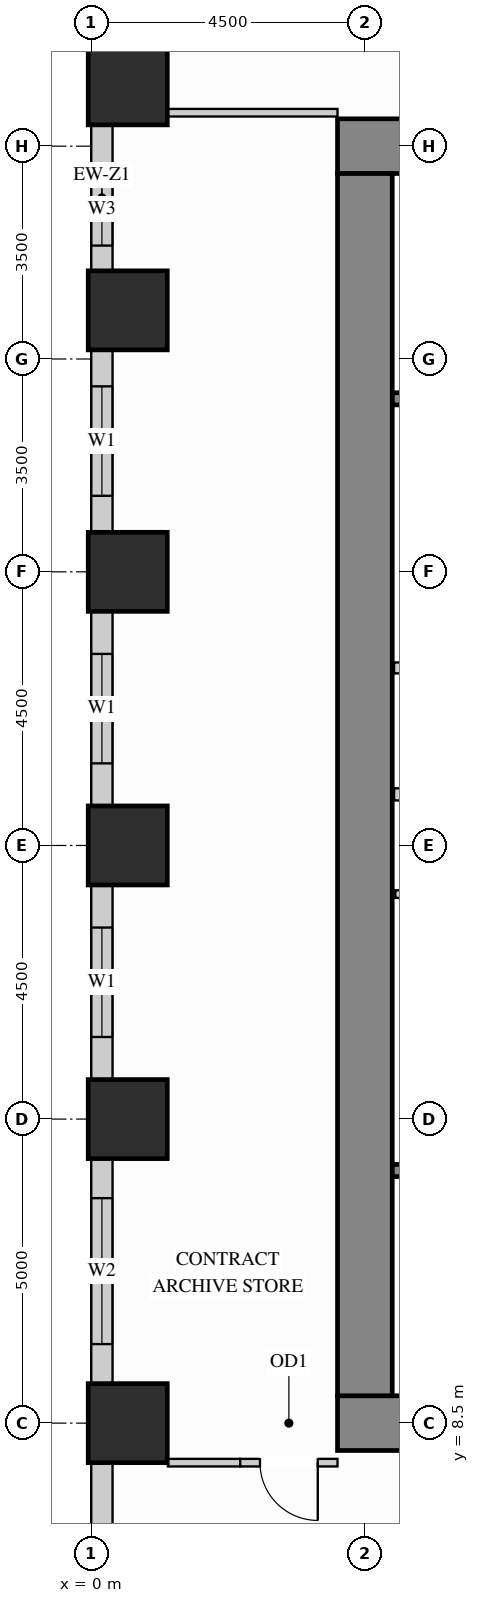
"""IFC4 building model, lengths in metres.
Left out: names, types, materials, properties, quantities, classifications, styles, units other than length and angle.
Written with IfcOpenShell. Run it as: python <this file> out.ifc"""

import sys

from ifc_helpers import new_model, si_unit, direction, frame, frame_2d, origin, origin_2d, place, context, subcontext, project, spatial, rectangle, extrude, source, transform, mapped, element, fill, save


model = new_model("IFC4")
c1 = context("Model", 3, precision=1e-05, world=origin(), true_north=direction((0.0, 1.0)))
c2 = subcontext(c1, "Body", "Model", "MODEL_VIEW")
j1 = project(units=[si_unit("LENGTHUNIT", "METRE"), si_unit("PLANEANGLEUNIT", "RADIAN")], contexts=[c1])
p1 = place(None, origin())
s1 = spatial("IfcSite", under=j1, at=p1, CompositionType="ELEMENT")
p2 = place(p1, origin())
s2 = spatial("IfcBuilding", under=s1, at=p2, CompositionType="ELEMENT")
p3 = place(p2, frame((0.0, 0.0, 62.1)))
s3 = spatial("IfcBuildingStorey", under=s2, at=p3, CompositionType="ELEMENT", Elevation=62.1)
m1 = source(origin(), c2, "Body", "SweptSolid", [
    extrude(rectangle(XDim=1.3, YDim=1.3, at=origin_2d()), origin(), (0.0, 0.0, 1.0), 3.38),
])
for number, where, z_axis, x_axis in (
    (1, (0.6, 13.5, 0.0), (0.0, 0.0, 1.0), (1.0, 0.0, 0.0)),
    (2, (0.6, 18.0, 0.0), (0.0, 0.0, 1.0), (1.0, 0.0, 0.0)),
    (3, (0.6, 22.5, 0.0), (0.0, 0.0, 1.0), (1.0, 0.0, 0.0)),
    (4, (0.6, 26.8, 0.0), (0.0, 0.0, 1.0), (1.0, 0.0, 0.0)),
    (5, (0.6, 30.5, 0.0), (0.0, 0.0, 1.0), (1.0, 0.0, 0.0)),
    (6, (0.6, 8.5, 0.0), (0.0, 0.0, 1.0), (1.0, 0.0, 0.0)),
):
    element("IfcColumn", number, at=place(p3, frame(where, z_axis=z_axis, x_axis=x_axis)), inside=s3, PredefinedType="COLUMN", context=c2, shape_type="MappedRepresentation", body=[
        mapped(m1, transform((0.0, 0.0, 0.0), x_axis=(1.0, 0.0, 0.0), y_axis=(0.0, 1.0, 0.0), z_axis=(0.0, 0.0, 1.0))),
    ])
m2 = source(origin(), c2, "Body", "SweptSolid", [
    extrude(rectangle(XDim=10.9, YDim=0.9, at=frame_2d((5.45, 0.0))), origin(), (0.0, 0.0, 1.0), 3.38),
])
for number, where, z_axis, x_axis in (
    (7, (4.05, 29.5, 0.0), (0.0, 0.0, 1.0), (1.0, 0.0, 0.0)),
    (8, (4.05, 8.5, 0.0), (0.0, 0.0, 1.0), (1.0, 0.0, 0.0)),
):
    element("IfcWall", number, at=place(p3, frame(where, z_axis=z_axis, x_axis=x_axis)), inside=s3, PredefinedType="SHEAR", context=c2, shape_type="MappedRepresentation", body=[
        mapped(m2, transform((0.0, 0.0, 0.0), x_axis=(1.0, 0.0, 0.0), y_axis=(0.0, 1.0, 0.0), z_axis=(0.0, 0.0, 1.0))),
    ])
m3 = source(origin(), c2, "Body", "SweptSolid", [
    extrude(rectangle(XDim=20.1, YDim=0.9, at=frame_2d((10.05, 0.0))), origin(), (0.0, 0.0, 1.0), 3.38),
])
p4 = place(p3, frame((4.5, 8.95, 0.0), z_axis=(0.0, 0.0, 1.0), x_axis=(0.0, 1.0, 0.0)))
e9 = element("IfcWall", 9, at=p4, inside=s3, PredefinedType="SHEAR", context=c2, shape_type="MappedRepresentation", body=[
    mapped(m3, transform((0.0, 0.0, 0.0), x_axis=(1.0, 0.0, 0.0), y_axis=(0.0, 1.0, 0.0), z_axis=(0.0, 0.0, 1.0))),
])
p5 = place(p3, frame((0.175, 29.852, 0.0), z_axis=(0.0, 0.0, 1.0), x_axis=(0.0, -1.0, 0.0)))
e10 = element("IfcWall", 10, at=p5, inside=s3, PredefinedType="SOLIDWALL", context=c2, shape_type="SweptSolid", body=[
    extrude(rectangle(XDim=2.404, YDim=0.35, at=frame_2d((1.202, 0.0))), origin(), (0.0, 0.0, 1.0), 2.51),
])
p6 = place(p5, frame((0.787, 0.0, 0.78)))
e11 = element("IfcOpeningElement", 11, at=p6, cuts=e10, PredefinedType="OPENING", context=c2, shape_type="SweptSolid", body=[
    extrude(rectangle(XDim=1.2, YDim=1.55, at=frame_2d((0.6, 0.775))), frame((0.0, 0.185, 0.0), z_axis=(0.0, -1.0, 0.0), x_axis=(1.0, 0.0, 0.0)), (0.0, 0.0, 1.0), 0.37),
])
p7 = place(p3, frame((0.175, 26.152, 0.0), z_axis=(0.0, 0.0, 1.0), x_axis=(0.0, -1.0, 0.0)))
e12 = element("IfcWall", 12, at=p7, inside=s3, PredefinedType="SOLIDWALL", context=c2, shape_type="SweptSolid", body=[
    extrude(rectangle(XDim=3.004, YDim=0.35, at=frame_2d((1.502, 0.0))), origin(), (0.0, 0.0, 1.0), 2.51),
])
p8 = place(p7, frame((0.602, 0.0, 0.78)))
e13 = element("IfcOpeningElement", 13, at=p8, cuts=e12, PredefinedType="OPENING", context=c2, shape_type="SweptSolid", body=[
    extrude(rectangle(XDim=1.8, YDim=1.55, at=frame_2d((0.9, 0.775))), frame((0.0, 0.185, 0.0), z_axis=(0.0, -1.0, 0.0), x_axis=(1.0, 0.0, 0.0)), (0.0, 0.0, 1.0), 0.37),
])
p9 = place(p3, frame((0.175, 21.852, 0.0), z_axis=(0.0, 0.0, 1.0), x_axis=(0.0, -1.0, 0.0)))
e14 = element("IfcWall", 14, at=p9, inside=s3, PredefinedType="SOLIDWALL", context=c2, shape_type="SweptSolid", body=[
    extrude(rectangle(XDim=3.204, YDim=0.35, at=frame_2d((1.602, 0.0))), origin(), (0.0, 0.0, 1.0), 2.51),
])
p10 = place(p9, frame((0.702, 0.0, 0.78)))
e15 = element("IfcOpeningElement", 15, at=p10, cuts=e14, PredefinedType="OPENING", context=c2, shape_type="SweptSolid", body=[
    extrude(rectangle(XDim=1.8, YDim=1.55, at=frame_2d((0.9, 0.775))), frame((0.0, 0.185, 0.0), z_axis=(0.0, -1.0, 0.0), x_axis=(1.0, 0.0, 0.0)), (0.0, 0.0, 1.0), 0.37),
])
p11 = place(p3, frame((0.175, 17.352, 0.0), z_axis=(0.0, 0.0, 1.0), x_axis=(0.0, -1.0, 0.0)))
e16 = element("IfcWall", 16, at=p11, inside=s3, PredefinedType="SOLIDWALL", context=c2, shape_type="SweptSolid", body=[
    extrude(rectangle(XDim=3.204, YDim=0.35, at=frame_2d((1.602, 0.0))), origin(), (0.0, 0.0, 1.0), 2.51),
])
p12 = place(p11, frame((0.702, 0.0, 0.78)))
e17 = element("IfcOpeningElement", 17, at=p12, cuts=e16, PredefinedType="OPENING", context=c2, shape_type="SweptSolid", body=[
    extrude(rectangle(XDim=1.8, YDim=1.55, at=frame_2d((0.9, 0.775))), frame((0.0, 0.185, 0.0), z_axis=(0.0, -1.0, 0.0), x_axis=(1.0, 0.0, 0.0)), (0.0, 0.0, 1.0), 0.37),
])
p13 = place(p3, frame((0.175, 12.852, 0.0), z_axis=(0.0, 0.0, 1.0), x_axis=(0.0, -1.0, 0.0)))
e18 = element("IfcWall", 18, at=p13, inside=s3, PredefinedType="SOLIDWALL", context=c2, shape_type="SweptSolid", body=[
    extrude(rectangle(XDim=3.704, YDim=0.35, at=frame_2d((1.852, 0.0))), origin(), (0.0, 0.0, 1.0), 2.51),
])
p14 = place(p13, frame((0.652, 0.0, 0.78)))
e19 = element("IfcOpeningElement", 19, at=p14, cuts=e18, PredefinedType="OPENING", context=c2, shape_type="SweptSolid", body=[
    extrude(rectangle(XDim=2.4, YDim=1.55, at=frame_2d((1.2, 0.775))), frame((0.0, 0.185, 0.0), z_axis=(0.0, -1.0, 0.0), x_axis=(1.0, 0.0, 0.0)), (0.0, 0.0, 1.0), 0.37),
])
p15 = place(p3, frame((0.175, 7.852, 0.0), z_axis=(0.0, 0.0, 1.0), x_axis=(0.0, -1.0, 0.0)))
e20 = element("IfcWall", 20, at=p15, inside=s3, PredefinedType="SOLIDWALL", context=c2, shape_type="SweptSolid", body=[
    extrude(rectangle(XDim=3.704, YDim=0.35, at=frame_2d((1.852, 0.0))), origin(), (0.0, 0.0, 1.0), 2.51),
])
p16 = place(p15, frame((2.068, 0.0, 0.78)))
e21 = element("IfcOpeningElement", 21, at=p16, cuts=e20, PredefinedType="OPENING", context=c2, shape_type="SweptSolid", body=[
    extrude(rectangle(XDim=1.2, YDim=1.55, at=frame_2d((0.6, 0.775))), frame((0.0, 0.185, 0.0), z_axis=(0.0, -1.0, 0.0), x_axis=(1.0, 0.0, 0.0)), (0.0, 0.0, 1.0), 0.37),
])
m4 = source(origin(), c2, "Body", "SweptSolid", [
    extrude(rectangle(XDim=2.17, YDim=0.18, at=frame_2d((1.085, 0.0))), origin(), (0.0, 0.0, 1.0), 3.365),
])
p17 = place(p3, frame((4.98, 20.92, 0.0), z_axis=(0.0, 0.0, 1.0), x_axis=(1.0, 0.0, 0.0)))
e22 = element("IfcWall", 22, at=p17, inside=s3, PredefinedType="PARTITIONING", context=c2, shape_type="MappedRepresentation", body=[
    mapped(m4, transform((0.0, 0.0, 0.0), x_axis=(1.0, 0.0, 0.0), y_axis=(0.0, 1.0, 0.0), z_axis=(0.0, 0.0, 1.0))),
])
p18 = place(p3, frame((5.0, 17.2, 0.0), z_axis=(0.0, 0.0, 1.0), x_axis=(1.0, 0.0, 0.0)))
e23 = element("IfcWall", 23, at=p18, inside=s3, PredefinedType="PARTITIONING", context=c2, shape_type="SweptSolid", body=[
    extrude(rectangle(XDim=2.4, YDim=0.125, at=frame_2d((1.2, 0.0))), origin(), (0.0, 0.0, 1.0), 3.365),
])
p19 = place(p18, frame((0.7, 0.0, 0.0)))
e24 = element("IfcOpeningElement", 24, at=p19, cuts=e23, PredefinedType="OPENING", context=c2, shape_type="SweptSolid", body=[
    extrude(rectangle(XDim=0.85, YDim=2.1, at=frame_2d((0.425, 1.05))), frame((0.0, 0.073, 0.0), z_axis=(0.0, -1.0, 0.0), x_axis=(1.0, 0.0, 0.0)), (0.0, 0.0, 1.0), 0.145),
])
m5 = source(origin(), c2, "Body", "SweptSolid", [
    extrude(rectangle(XDim=2.79, YDim=0.125, at=frame_2d((1.395, 0.0))), origin(), (0.0, 0.0, 1.0), 3.365),
])
p20 = place(p3, frame((1.26, 30.05, 0.0), z_axis=(0.0, 0.0, 1.0), x_axis=(1.0, 0.0, 0.0)))
e25 = element("IfcWall", 25, at=p20, inside=s3, PredefinedType="PARTITIONING", context=c2, shape_type="MappedRepresentation", body=[
    mapped(m5, transform((0.0, 0.0, 0.0), x_axis=(1.0, 0.0, 0.0), y_axis=(0.0, 1.0, 0.0), z_axis=(0.0, 0.0, 1.0))),
])
m6 = source(origin(), c2, "Body", "SweptSolid", [
    extrude(rectangle(XDim=1.19, YDim=0.125, at=frame_2d((0.595, 0.0))), origin(), (0.0, 0.0, 1.0), 3.365),
])
p21 = place(p3, frame((1.26, 7.85, 0.0), z_axis=(0.0, 0.0, 1.0), x_axis=(1.0, 0.0, 0.0)))
e26 = element("IfcWall", 26, at=p21, inside=s3, PredefinedType="PARTITIONING", context=c2, shape_type="MappedRepresentation", body=[
    mapped(m6, transform((0.0, 0.0, 0.0), x_axis=(1.0, 0.0, 0.0), y_axis=(0.0, 1.0, 0.0), z_axis=(0.0, 0.0, 1.0))),
])
p22 = place(p3, frame((2.45, 7.85, 0.0), z_axis=(0.0, 0.0, 1.0), x_axis=(1.0, 0.0, 0.0)))
e27 = element("IfcWall", 27, at=p22, inside=s3, PredefinedType="PARTITIONING", context=c2, shape_type="SweptSolid", body=[
    extrude(rectangle(XDim=1.6, YDim=0.125, at=frame_2d((0.8, 0.0))), origin(), (0.0, 0.0, 1.0), 3.365),
])
p23 = place(p22, frame((0.325, 0.0, 0.0)))
e28 = element("IfcOpeningElement", 28, at=p23, cuts=e27, PredefinedType="OPENING", context=c2, shape_type="SweptSolid", body=[
    extrude(rectangle(XDim=0.95, YDim=2.15, at=frame_2d((0.475, 1.075))), frame((0.0, 0.073, 0.0), z_axis=(0.0, -1.0, 0.0), x_axis=(1.0, 0.0, 0.0)), (0.0, 0.0, 1.0), 0.145),
])
m7 = source(origin(), c2, "Body", "SweptSolid", [
    extrude(rectangle(XDim=2.09, YDim=0.2, at=frame_2d((1.045, 0.0))), origin(), (0.0, 0.0, 1.0), 3.365),
])
p24 = place(p3, frame((4.98, 18.84, 0.0), z_axis=(0.0, 0.0, 1.0), x_axis=(1.0, 0.0, 0.0)))
e29 = element("IfcWall", 29, at=p24, inside=s3, PredefinedType="PARTITIONING", context=c2, shape_type="MappedRepresentation", body=[
    mapped(m7, transform((0.0, 0.0, 0.0), x_axis=(1.0, 0.0, 0.0), y_axis=(0.0, 1.0, 0.0), z_axis=(0.0, 0.0, 1.0))),
])
p25 = place(p3, frame((4.952, 12.655, 0.0), z_axis=(0.0, 0.0, 1.0), x_axis=(1.0, 0.0, 0.0)))
e30 = element("IfcWall", 30, at=p25, inside=s3, PredefinedType="SHEAR", context=c2, shape_type="SweptSolid", body=[
    extrude(rectangle(XDim=7.453, YDim=0.2, at=frame_2d((3.727, 0.0))), origin(), (0.0, 0.0, 1.0), 3.38),
])
p26 = place(p25, frame((0.4, 0.0, 0.0)))
e31 = element("IfcOpeningElement", 31, at=p26, cuts=e30, PredefinedType="OPENING", context=c2, shape_type="SweptSolid", body=[
    extrude(rectangle(XDim=1.1, YDim=2.15, at=frame_2d((0.55, 1.075))), frame((0.0, 0.11, 0.0), z_axis=(0.0, -1.0, 0.0), x_axis=(1.0, 0.0, 0.0)), (0.0, 0.0, 1.0), 0.22),
])
p27 = place(p3, frame((4.952, 25.345, 0.0), z_axis=(0.0, 0.0, 1.0), x_axis=(1.0, 0.0, 0.0)))
e32 = element("IfcWall", 32, at=p27, inside=s3, PredefinedType="SHEAR", context=c2, shape_type="SweptSolid", body=[
    extrude(rectangle(XDim=7.453, YDim=0.2, at=frame_2d((3.727, 0.0))), origin(), (0.0, 0.0, 1.0), 3.38),
])
p28 = place(p27, frame((0.4, 0.0, 0.0)))
e33 = element("IfcOpeningElement", 33, at=p28, cuts=e32, PredefinedType="OPENING", context=c2, shape_type="SweptSolid", body=[
    extrude(rectangle(XDim=1.1, YDim=2.15, at=frame_2d((0.55, 1.075))), frame((0.0, 0.11, 0.0), z_axis=(0.0, -1.0, 0.0), x_axis=(1.0, 0.0, 0.0)), (0.0, 0.0, 1.0), 0.22),
])
m8 = source(origin(), c2, "Body", "SweptSolid", [
    extrude(rectangle(XDim=0.95, YDim=2.15, at=frame_2d((0.475, 1.075))), frame((0.0, 0.025, 0.0), z_axis=(0.0, -1.0, 0.0), x_axis=(1.0, 0.0, 0.0)), (0.0, 0.0, 1.0), 0.05),
])
p29 = place(p23, origin())
e34 = element("IfcDoor", 34, at=p29, inside=s3, OperationType="SINGLE_SWING_RIGHT", PredefinedType="DOOR", context=c2, shape_type="MappedRepresentation", body=[
    mapped(m8, transform((0.0, 0.0, 0.0), x_axis=(1.0, 0.0, 0.0), y_axis=(0.0, 1.0, 0.0), z_axis=(0.0, 0.0, 1.0))),
])
fill(e28, e34)
m9 = source(origin(), c2, "Body", "SweptSolid", [
    extrude(rectangle(XDim=1.8, YDim=1.55, at=frame_2d((0.9, 0.775))), frame((0.0, 0.03, 0.0), z_axis=(0.0, -1.0, 0.0), x_axis=(1.0, 0.0, 0.0)), (0.0, 0.0, 1.0), 0.06),
])
p30 = place(p8, origin())
e35 = element("IfcWindow", 35, at=p30, inside=s3, PartitioningType="SINGLE_PANEL", PredefinedType="WINDOW", context=c2, shape_type="MappedRepresentation", body=[
    mapped(m9, transform((0.0, 0.0, 0.0), x_axis=(1.0, 0.0, 0.0), y_axis=(0.0, 1.0, 0.0), z_axis=(0.0, 0.0, 1.0))),
])
fill(e13, e35)
p31 = place(p10, origin())
e36 = element("IfcWindow", 36, at=p31, inside=s3, PartitioningType="SINGLE_PANEL", PredefinedType="WINDOW", context=c2, shape_type="MappedRepresentation", body=[
    mapped(m9, transform((0.0, 0.0, 0.0), x_axis=(1.0, 0.0, 0.0), y_axis=(0.0, 1.0, 0.0), z_axis=(0.0, 0.0, 1.0))),
])
fill(e15, e36)
p32 = place(p12, origin())
e37 = element("IfcWindow", 37, at=p32, inside=s3, PartitioningType="SINGLE_PANEL", PredefinedType="WINDOW", context=c2, shape_type="MappedRepresentation", body=[
    mapped(m9, transform((0.0, 0.0, 0.0), x_axis=(1.0, 0.0, 0.0), y_axis=(0.0, 1.0, 0.0), z_axis=(0.0, 0.0, 1.0))),
])
fill(e17, e37)
m10 = source(origin(), c2, "Body", "SweptSolid", [
    extrude(rectangle(XDim=2.4, YDim=1.55, at=frame_2d((1.2, 0.775))), frame((0.0, 0.03, 0.0), z_axis=(0.0, -1.0, 0.0), x_axis=(1.0, 0.0, 0.0)), (0.0, 0.0, 1.0), 0.06),
])
p33 = place(p14, origin())
e38 = element("IfcWindow", 38, at=p33, inside=s3, PartitioningType="SINGLE_PANEL", PredefinedType="WINDOW", context=c2, shape_type="MappedRepresentation", body=[
    mapped(m10, transform((0.0, 0.0, 0.0), x_axis=(1.0, 0.0, 0.0), y_axis=(0.0, 1.0, 0.0), z_axis=(0.0, 0.0, 1.0))),
])
fill(e19, e38)
m11 = source(origin(), c2, "Body", "SweptSolid", [
    extrude(rectangle(XDim=1.2, YDim=1.55, at=frame_2d((0.6, 0.775))), frame((0.0, 0.03, 0.0), z_axis=(0.0, -1.0, 0.0), x_axis=(1.0, 0.0, 0.0)), (0.0, 0.0, 1.0), 0.06),
])
p34 = place(p6, origin())
e39 = element("IfcWindow", 39, at=p34, inside=s3, PartitioningType="SINGLE_PANEL", PredefinedType="WINDOW", context=c2, shape_type="MappedRepresentation", body=[
    mapped(m11, transform((0.0, 0.0, 0.0), x_axis=(1.0, 0.0, 0.0), y_axis=(0.0, 1.0, 0.0), z_axis=(0.0, 0.0, 1.0))),
])
fill(e11, e39)
save(model, sys.argv[1])
